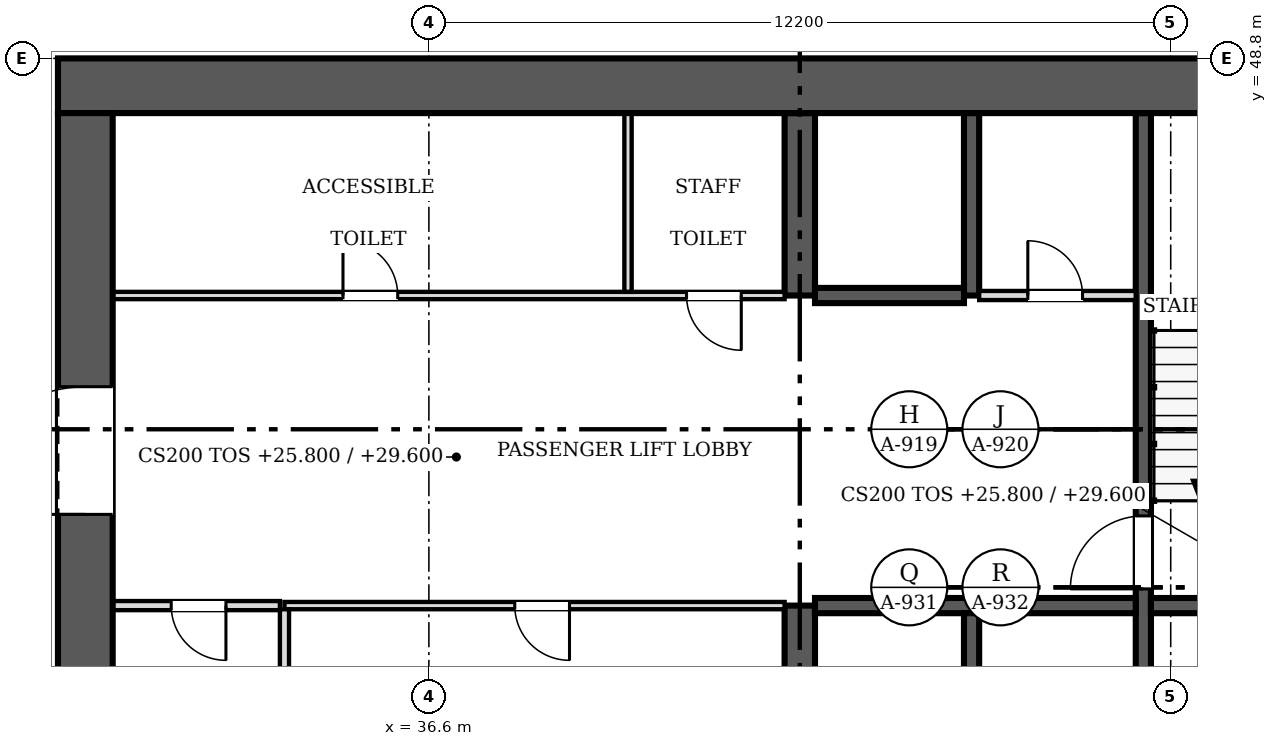
"""IFC4 building model, lengths in metres.
Left out: names, types, materials, properties, quantities, classifications, styles, units other than length and angle.
Written with IfcOpenShell. Run it as: python <this file> out.ifc"""

import sys

from ifc_helpers import new_model, si_unit, direction, frame, frame_2d, origin, place, context, subcontext, project, spatial, rectangle, extrude, source, transform, mapped, element, fill, save


model = new_model("IFC4")
c1 = context("Model", 3, precision=1e-05, world=origin(), true_north=direction((0.0, 1.0)))
c2 = subcontext(c1, "Body", "Model", "MODEL_VIEW")
j1 = project(units=[si_unit("LENGTHUNIT", "METRE"), si_unit("PLANEANGLEUNIT", "RADIAN")], contexts=[c1])
p1 = place(None, origin())
s1 = spatial("IfcSite", under=j1, at=p1, CompositionType="ELEMENT")
p2 = place(p1, origin())
s2 = spatial("IfcBuilding", under=s1, at=p2, CompositionType="ELEMENT")
p3 = place(p2, frame((0.0, 0.0, 25.8)))
s3 = spatial("IfcBuildingStorey", under=s2, at=p3, CompositionType="ELEMENT", Elevation=25.8)
p4 = place(p3, frame((30.95, 25.3, 0.0), z_axis=(0.0, 0.0, 1.0), x_axis=(0.0, 1.0, 0.0)))
e1 = element("IfcWall", 1, at=p4, inside=s3, PredefinedType="SHEAR", context=c2, shape_type="SweptSolid", body=[
    extrude(rectangle(XDim=22.6, YDim=0.9, at=frame_2d((11.3, 0.0))), origin(), (0.0, 0.0, 1.0), 3.8),
])
m1 = source(origin(), c2, "Body", "SweptSolid", [
    extrude(rectangle(XDim=2.1, YDim=2.4, at=frame_2d((1.05, 1.2))), frame((0.0, 0.46, 0.0), z_axis=(0.0, -1.0, 0.0), x_axis=(1.0, 0.0, 0.0)), (0.0, 0.0, 1.0), 0.92),
])
p5 = place(p4, frame((4.5, 0.0, 0.0)))
e2 = element("IfcOpeningElement", 2, at=p5, cuts=e1, PredefinedType="OPENING", context=c2, shape_type="MappedRepresentation", body=[
    mapped(m1, transform((0.0, 0.0, 0.0), scale=1.0)),
])
p6 = place(p4, frame((16.0, 0.0, 0.0)))
e3 = element("IfcOpeningElement", 3, at=p6, cuts=e1, PredefinedType="OPENING", context=c2, shape_type="MappedRepresentation", body=[
    mapped(m1, transform((0.0, 0.0, 0.0), scale=1.0)),
])
p7 = place(p3, frame((30.5, 48.35, 0.0), z_axis=(0.0, 0.0, 1.0), x_axis=(1.0, 0.0, 0.0)))
e4 = element("IfcWall", 4, at=p7, inside=s3, PredefinedType="SHEAR", context=c2, shape_type="SweptSolid", body=[
    extrude(rectangle(XDim=24.4, YDim=0.9, at=frame_2d((12.2, 0.0))), origin(), (0.0, 0.0, 1.0), 3.8),
])
p8 = place(p3, frame((42.7, 36.85, 0.0), z_axis=(0.0, 0.0, 1.0), x_axis=(0.0, 1.0, 0.0)))
e5 = element("IfcWall", 5, at=p8, inside=s3, PredefinedType="SHEAR", context=c2, shape_type="SweptSolid", body=[
    extrude(rectangle(XDim=2.95, YDim=0.5, at=frame_2d((1.475, 0.0))), origin(), (0.0, 0.0, 1.0), 3.8),
])
p9 = place(p3, frame((42.7, 44.9, 0.0), z_axis=(0.0, 0.0, 1.0), x_axis=(0.0, 1.0, 0.0)))
e6 = element("IfcWall", 6, at=p9, inside=s3, PredefinedType="SHEAR", context=c2, shape_type="SweptSolid", body=[
    extrude(rectangle(XDim=3.0, YDim=0.5, at=frame_2d((1.5, 0.0))), origin(), (0.0, 0.0, 1.0), 3.8),
])
p10 = place(p3, frame((48.35, 47.9, 0.0), z_axis=(0.0, 0.0, 1.0), x_axis=(0.0, -1.0, 0.0)))
e7 = element("IfcWall", 7, at=p10, inside=s3, PredefinedType="SOLIDWALL", context=c2, shape_type="SweptSolid", body=[
    extrude(rectangle(XDim=11.05, YDim=0.25, at=frame_2d((5.525, 0.0))), origin(), (0.0, 0.0, 1.0), 3.8),
])
m2 = source(origin(), c2, "Body", "SweptSolid", [
    extrude(rectangle(XDim=1.2, YDim=2.1, at=frame_2d((0.6, 1.05))), frame((0.0, 0.135, 0.0), z_axis=(0.0, -1.0, 0.0), x_axis=(1.0, 0.0, 0.0)), (0.0, 0.0, 1.0), 0.27),
])
p11 = place(p10, frame((6.625, 0.0, 0.0)))
e8 = element("IfcOpeningElement", 8, at=p11, cuts=e7, PredefinedType="OPENING", context=c2, shape_type="MappedRepresentation", body=[
    mapped(m2, transform((0.0, 0.0, 0.0), scale=1.0)),
])
p12 = place(p3, frame((42.95, 39.8, 0.0), z_axis=(0.0, 0.0, 1.0), x_axis=(1.0, 0.0, 0.0)))
e9 = element("IfcWall", 9, at=p12, inside=s3, PredefinedType="SOLIDWALL", context=c2, shape_type="SweptSolid", body=[
    extrude(rectangle(XDim=5.275, YDim=0.25, at=frame_2d((2.638, 0.0))), origin(), (0.0, 0.0, 1.0), 3.8),
])
p13 = place(p3, frame((48.475, 39.8, 0.0), z_axis=(0.0, 0.0, 1.0), x_axis=(1.0, 0.0, 0.0)))
e10 = element("IfcWall", 10, at=p13, inside=s3, PredefinedType="SOLIDWALL", context=c2, shape_type="SweptSolid", body=[
    extrude(rectangle(XDim=3.525, YDim=0.25, at=frame_2d((1.762, 0.0))), origin(), (0.0, 0.0, 1.0), 3.8),
])
p14 = place(p3, frame((45.525, 36.85, 0.0), z_axis=(0.0, 0.0, 1.0), x_axis=(0.0, 1.0, 0.0)))
e11 = element("IfcWall", 11, at=p14, inside=s3, PredefinedType="SOLIDWALL", context=c2, shape_type="SweptSolid", body=[
    extrude(rectangle(XDim=2.825, YDim=0.25, at=frame_2d((1.413, 0.0))), origin(), (0.0, 0.0, 1.0), 3.8),
])
p15 = place(p3, frame((45.525, 44.9, 0.0), z_axis=(0.0, 0.0, 1.0), x_axis=(0.0, 1.0, 0.0)))
e12 = element("IfcWall", 12, at=p15, inside=s3, PredefinedType="SOLIDWALL", context=c2, shape_type="SweptSolid", body=[
    extrude(rectangle(XDim=3.0, YDim=0.25, at=frame_2d((1.5, 0.0))), origin(), (0.0, 0.0, 1.0), 3.8),
])
p16 = place(p3, frame((42.95, 44.9, 0.0), z_axis=(0.0, 0.0, 1.0), x_axis=(1.0, 0.0, 0.0)))
e13 = element("IfcWall", 13, at=p16, inside=s3, PredefinedType="SOLIDWALL", context=c2, shape_type="SweptSolid", body=[
    extrude(rectangle(XDim=2.45, YDim=0.25, at=frame_2d((1.225, 0.0))), origin(), (0.0, 0.0, 1.0), 3.8),
])
p17 = place(p3, frame((31.4, 44.9, 0.0), z_axis=(0.0, 0.0, 1.0), x_axis=(1.0, 0.0, 0.0)))
e14 = element("IfcWall", 14, at=p17, inside=s3, PredefinedType="PARTITIONING", context=c2, shape_type="SweptSolid", body=[
    extrude(rectangle(XDim=11.05, YDim=0.12, at=frame_2d((5.525, 0.0))), origin(), (0.0, 0.0, 1.0), 3.6),
])
m3 = source(origin(), c2, "Body", "SweptSolid", [
    extrude(rectangle(XDim=0.9, YDim=2.1, at=frame_2d((0.45, 1.05))), frame((0.0, 0.07, 0.0), z_axis=(0.0, -1.0, 0.0), x_axis=(1.0, 0.0, 0.0)), (0.0, 0.0, 1.0), 0.14),
])
p18 = place(p17, frame((3.788, 0.0, 0.0)))
e15 = element("IfcOpeningElement", 15, at=p18, cuts=e14, PredefinedType="OPENING", context=c2, shape_type="MappedRepresentation", body=[
    mapped(m3, transform((0.0, 0.0, 0.0), scale=1.0)),
])
p19 = place(p17, frame((9.438, 0.0, 0.0)))
e16 = element("IfcOpeningElement", 16, at=p19, cuts=e14, PredefinedType="OPENING", context=c2, shape_type="MappedRepresentation", body=[
    mapped(m3, transform((0.0, 0.0, 0.0), scale=1.0)),
])
p20 = place(p3, frame((42.45, 39.8, 0.0), z_axis=(0.0, 0.0, 1.0), x_axis=(-1.0, 0.0, 0.0)))
e17 = element("IfcWall", 17, at=p20, inside=s3, PredefinedType="PARTITIONING", context=c2, shape_type="SweptSolid", body=[
    extrude(rectangle(XDim=8.225, YDim=0.12, at=frame_2d((4.112, 0.0))), origin(), (0.0, 0.0, 1.0), 3.6),
])
p21 = place(p20, frame((3.538, 0.0, 0.0)))
e18 = element("IfcOpeningElement", 18, at=p21, cuts=e17, PredefinedType="OPENING", context=c2, shape_type="MappedRepresentation", body=[
    mapped(m3, transform((0.0, 0.0, 0.0), scale=1.0)),
])
p22 = place(p3, frame((34.225, 36.85, 0.0), z_axis=(0.0, 0.0, 1.0), x_axis=(0.0, 1.0, 0.0)))
e19 = element("IfcWall", 19, at=p22, inside=s3, PredefinedType="PARTITIONING", context=c2, shape_type="SweptSolid", body=[
    extrude(rectangle(XDim=2.89, YDim=0.15, at=frame_2d((1.445, 0.0))), origin(), (0.0, 0.0, 1.0), 3.6),
])
p23 = place(p3, frame((39.875, 44.96, 0.0), z_axis=(0.0, 0.0, 1.0), x_axis=(0.0, 1.0, 0.0)))
e20 = element("IfcWall", 20, at=p23, inside=s3, PredefinedType="PARTITIONING", context=c2, shape_type="SweptSolid", body=[
    extrude(rectangle(XDim=2.94, YDim=0.12, at=frame_2d((1.47, 0.0))), origin(), (0.0, 0.0, 1.0), 3.6),
])
p24 = place(p3, frame((45.65, 44.9, 0.0), z_axis=(0.0, 0.0, 1.0), x_axis=(1.0, 0.0, 0.0)))
e21 = element("IfcWall", 21, at=p24, inside=s3, PredefinedType="PARTITIONING", context=c2, shape_type="SweptSolid", body=[
    extrude(rectangle(XDim=2.575, YDim=0.15, at=frame_2d((1.288, 0.0))), origin(), (0.0, 0.0, 1.0), 3.6),
])
m4 = source(origin(), c2, "Body", "SweptSolid", [
    extrude(rectangle(XDim=0.9, YDim=2.1, at=frame_2d((0.45, 1.05))), frame((0.0, 0.085, 0.0), z_axis=(0.0, -1.0, 0.0), x_axis=(1.0, 0.0, 0.0)), (0.0, 0.0, 1.0), 0.17),
])
p25 = place(p24, frame((0.8, 0.0, 0.0)))
e22 = element("IfcOpeningElement", 22, at=p25, cuts=e21, PredefinedType="OPENING", context=c2, shape_type="MappedRepresentation", body=[
    mapped(m4, transform((0.0, 0.0, 0.0), scale=1.0)),
])
p26 = place(p3, frame((34.15, 39.8, 0.0), z_axis=(0.0, 0.0, 1.0), x_axis=(-1.0, 0.0, 0.0)))
e23 = element("IfcWall", 23, at=p26, inside=s3, PredefinedType="PARTITIONING", context=c2, shape_type="SweptSolid", body=[
    extrude(rectangle(XDim=2.75, YDim=0.15, at=frame_2d((1.375, 0.0))), origin(), (0.0, 0.0, 1.0), 3.6),
])
p27 = place(p26, frame((0.887, 0.0, 0.0)))
e24 = element("IfcOpeningElement", 24, at=p27, cuts=e23, PredefinedType="OPENING", context=c2, shape_type="MappedRepresentation", body=[
    mapped(m4, transform((0.0, 0.0, 0.0), scale=1.0)),
])
m5 = source(origin(), c2, "Body", "SweptSolid", [
    extrude(rectangle(XDim=2.1, YDim=2.4, at=frame_2d((1.05, 1.2))), frame((0.0, 0.025, 0.0), z_axis=(0.0, -1.0, 0.0), x_axis=(1.0, 0.0, 0.0)), (0.0, 0.0, 1.0), 0.05),
])
p28 = place(p6, origin())
e25 = element("IfcDoor", 25, at=p28, inside=s3, OperationType="DOUBLE_DOOR_SINGLE_SWING", PredefinedType="DOOR", context=c2, shape_type="MappedRepresentation", body=[
    mapped(m5, transform((0.0, 0.0, 0.0), scale=1.0)),
])
fill(e3, e25)
m6 = source(origin(), c2, "Body", "SweptSolid", [
    extrude(rectangle(XDim=1.2, YDim=2.1, at=frame_2d((0.6, 1.05))), frame((0.0, 0.025, 0.0), z_axis=(0.0, -1.0, 0.0), x_axis=(1.0, 0.0, 0.0)), (0.0, 0.0, 1.0), 0.05),
])
p29 = place(p11, origin())
e26 = element("IfcDoor", 26, at=p29, inside=s3, OperationType="SINGLE_SWING_RIGHT", PredefinedType="DOOR", context=c2, shape_type="MappedRepresentation", body=[
    mapped(m6, transform((0.0, 0.0, 0.0), scale=1.0)),
])
fill(e8, e26)
m7 = source(origin(), c2, "Body", "SweptSolid", [
    extrude(rectangle(XDim=0.9, YDim=2.1, at=frame_2d((0.45, 1.05))), frame((0.0, 0.025, 0.0), z_axis=(0.0, -1.0, 0.0), x_axis=(1.0, 0.0, 0.0)), (0.0, 0.0, 1.0), 0.05),
])
p30 = place(p18, origin())
e27 = element("IfcDoor", 27, at=p30, inside=s3, OperationType="SINGLE_SWING_LEFT", PredefinedType="DOOR", context=c2, shape_type="MappedRepresentation", body=[
    mapped(m7, transform((0.0, 0.0, 0.0), scale=1.0)),
])
fill(e15, e27)
p31 = place(p19, origin())
e28 = element("IfcDoor", 28, at=p31, inside=s3, OperationType="SINGLE_SWING_RIGHT", PredefinedType="DOOR", context=c2, shape_type="MappedRepresentation", body=[
    mapped(m7, transform((0.0, 0.0, 0.0), scale=1.0)),
])
fill(e16, e28)
p32 = place(p21, origin())
e29 = element("IfcDoor", 29, at=p32, inside=s3, OperationType="SINGLE_SWING_LEFT", PredefinedType="DOOR", context=c2, shape_type="MappedRepresentation", body=[
    mapped(m7, transform((0.0, 0.0, 0.0), scale=1.0)),
])
fill(e18, e29)
p33 = place(p25, origin())
e30 = element("IfcDoor", 30, at=p33, inside=s3, OperationType="SINGLE_SWING_LEFT", PredefinedType="DOOR", context=c2, shape_type="MappedRepresentation", body=[
    mapped(m7, transform((0.0, 0.0, 0.0), scale=1.0)),
])
fill(e22, e30)
p34 = place(p27, origin())
e31 = element("IfcDoor", 31, at=p34, inside=s3, OperationType="SINGLE_SWING_LEFT", PredefinedType="DOOR", context=c2, shape_type="MappedRepresentation", body=[
    mapped(m7, transform((0.0, 0.0, 0.0), scale=1.0)),
])
fill(e24, e31)
save(model, sys.argv[1])
